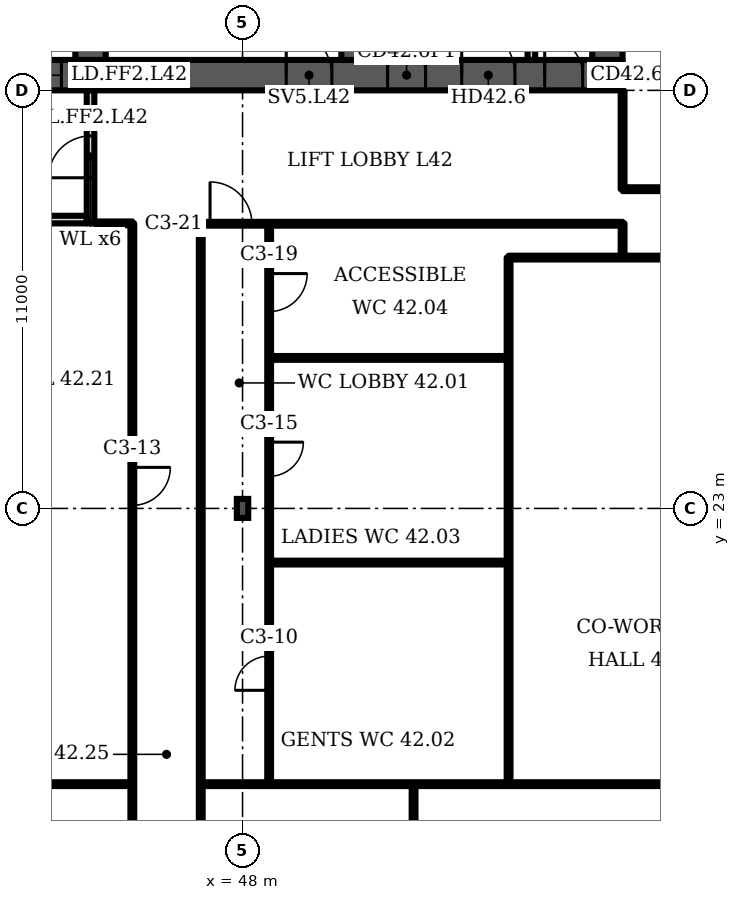
"""IFC4 building model, lengths in metres.
Left out: names, types, materials, properties, quantities, classifications, styles, units other than length and angle.
Written with IfcOpenShell. Run it as: python <this file> out.ifc"""

import sys

from ifc_helpers import new_model, si_unit, direction, frame, frame_2d, origin, origin_2d, place, context, subcontext, project, spatial, polyline, rectangle, i_section, outline, extrude, element, fill, save


model = new_model("IFC4")
c1 = context("Model", 3, precision=1e-05, world=origin(), true_north=direction((0.0, 1.0)))
c2 = subcontext(c1, "Body", "Model", "MODEL_VIEW")
j1 = project(units=[si_unit("LENGTHUNIT", "METRE"), si_unit("PLANEANGLEUNIT", "RADIAN")], contexts=[c1])
p1 = place(None, origin())
s1 = spatial("IfcSite", under=j1, at=p1, CompositionType="ELEMENT")
p2 = place(p1, origin())
s2 = spatial("IfcBuilding", under=s1, at=p2, CompositionType="ELEMENT")
p3 = place(p2, frame((0.0, 0.0, 173.5)))
s3 = spatial("IfcBuildingStorey", under=s2, at=p3, CompositionType="ELEMENT", Elevation=173.5)
p4 = place(p3, frame((16.0, 34.4, 0.0), z_axis=(0.0, 0.0, 1.0), x_axis=(1.0, 0.0, 0.0)))
e1 = element("IfcWall", 1, at=p4, inside=s3, PredefinedType="SHEAR", context=c2, shape_type="SweptSolid", body=[
    extrude(rectangle(XDim=42.0, YDim=0.8, at=frame_2d((21.0, 0.0))), origin(), (0.0, 0.0, 1.0), 3.6),
])
p5 = place(p4, frame((3.2, 0.0, 0.0)))
e2 = element("IfcOpeningElement", 2, at=p5, cuts=e1, PredefinedType="OPENING", context=c2, shape_type="SweptSolid", body=[
    extrude(rectangle(XDim=1.0, YDim=2.1, at=frame_2d((0.5, 1.05))), frame((0.0, 0.41, 0.0), z_axis=(0.0, -1.0, 0.0), x_axis=(1.0, 0.0, 0.0)), (0.0, 0.0, 1.0), 0.82),
])
p6 = place(p4, frame((7.65, 0.0, 0.0)))
e3 = element("IfcOpeningElement", 3, at=p6, cuts=e1, PredefinedType="OPENING", context=c2, shape_type="SweptSolid", body=[
    extrude(rectangle(XDim=1.2, YDim=2.1, at=frame_2d((0.6, 1.05))), frame((0.0, 0.41, 0.0), z_axis=(0.0, -1.0, 0.0), x_axis=(1.0, 0.0, 0.0)), (0.0, 0.0, 1.0), 0.82),
])
p7 = place(p4, frame((14.767, 0.0, 0.0)))
e4 = element("IfcOpeningElement", 4, at=p7, cuts=e1, PredefinedType="OPENING", context=c2, shape_type="SweptSolid", body=[
    extrude(rectangle(XDim=1.1, YDim=2.1, at=frame_2d((0.55, 1.05))), frame((0.0, 0.41, 0.0), z_axis=(0.0, -1.0, 0.0), x_axis=(1.0, 0.0, 0.0)), (0.0, 0.0, 1.0), 0.82),
])
p8 = place(p4, frame((19.133, 0.0, 0.0)))
e5 = element("IfcOpeningElement", 5, at=p8, cuts=e1, PredefinedType="OPENING", context=c2, shape_type="SweptSolid", body=[
    extrude(rectangle(XDim=1.1, YDim=2.1, at=frame_2d((0.55, 1.05))), frame((0.0, 0.41, 0.0), z_axis=(0.0, -1.0, 0.0), x_axis=(1.0, 0.0, 0.0)), (0.0, 0.0, 1.0), 0.82),
])
p9 = place(p4, frame((16.8, 0.0, 0.0)))
e6 = element("IfcOpeningElement", 6, at=p9, cuts=e1, PredefinedType="OPENING", context=c2, shape_type="SweptSolid", body=[
    extrude(rectangle(XDim=1.4, YDim=2.1, at=frame_2d((0.7, 1.05))), frame((0.0, 0.41, 0.0), z_axis=(0.0, -1.0, 0.0), x_axis=(1.0, 0.0, 0.0)), (0.0, 0.0, 1.0), 0.82),
])
p10 = place(p4, frame((21.767, 0.0, 0.0)))
e7 = element("IfcOpeningElement", 7, at=p10, cuts=e1, PredefinedType="OPENING", context=c2, shape_type="SweptSolid", body=[
    extrude(rectangle(XDim=1.1, YDim=2.1, at=frame_2d((0.55, 1.05))), frame((0.0, 0.41, 0.0), z_axis=(0.0, -1.0, 0.0), x_axis=(1.0, 0.0, 0.0)), (0.0, 0.0, 1.0), 0.82),
])
p11 = place(p4, frame((23.95, 0.0, 0.0)))
e8 = element("IfcOpeningElement", 8, at=p11, cuts=e1, PredefinedType="OPENING", context=c2, shape_type="SweptSolid", body=[
    extrude(rectangle(XDim=1.1, YDim=2.1, at=frame_2d((0.55, 1.05))), frame((0.0, 0.41, 0.0), z_axis=(0.0, -1.0, 0.0), x_axis=(1.0, 0.0, 0.0)), (0.0, 0.0, 1.0), 0.82),
])
p12 = place(p4, frame((26.133, 0.0, 0.0)))
e9 = element("IfcOpeningElement", 9, at=p12, cuts=e1, PredefinedType="OPENING", context=c2, shape_type="SweptSolid", body=[
    extrude(rectangle(XDim=1.1, YDim=2.1, at=frame_2d((0.55, 1.05))), frame((0.0, 0.41, 0.0), z_axis=(0.0, -1.0, 0.0), x_axis=(1.0, 0.0, 0.0)), (0.0, 0.0, 1.0), 0.82),
])
p13 = place(p4, frame((33.15, 0.0, 0.0)))
e10 = element("IfcOpeningElement", 10, at=p13, cuts=e1, PredefinedType="OPENING", context=c2, shape_type="SweptSolid", body=[
    extrude(rectangle(XDim=1.2, YDim=2.1, at=frame_2d((0.6, 1.05))), frame((0.0, 0.41, 0.0), z_axis=(0.0, -1.0, 0.0), x_axis=(1.0, 0.0, 0.0)), (0.0, 0.0, 1.0), 0.82),
])
p14 = place(p4, frame((35.817, 0.0, 0.0)))
e11 = element("IfcOpeningElement", 11, at=p14, cuts=e1, PredefinedType="OPENING", context=c2, shape_type="SweptSolid", body=[
    extrude(rectangle(XDim=1.0, YDim=2.1, at=frame_2d((0.5, 1.05))), frame((0.0, 0.41, 0.0), z_axis=(0.0, -1.0, 0.0), x_axis=(1.0, 0.0, 0.0)), (0.0, 0.0, 1.0), 0.82),
])
p15 = place(p4, frame((39.95, 0.0, 0.0)))
e12 = element("IfcOpeningElement", 12, at=p15, cuts=e1, PredefinedType="OPENING", context=c2, shape_type="SweptSolid", body=[
    extrude(rectangle(XDim=1.0, YDim=2.1, at=frame_2d((0.5, 1.05))), frame((0.0, 0.41, 0.0), z_axis=(0.0, -1.0, 0.0), x_axis=(1.0, 0.0, 0.0)), (0.0, 0.0, 1.0), 0.82),
])
p16 = place(p4, frame((37.767, 0.0, 0.0)))
e13 = element("IfcOpeningElement", 13, at=p16, cuts=e1, PredefinedType="OPENING", context=c2, shape_type="SweptSolid", body=[
    extrude(rectangle(XDim=1.4, YDim=2.1, at=frame_2d((0.7, 1.05))), frame((0.0, 0.41, 0.0), z_axis=(0.0, -1.0, 0.0), x_axis=(1.0, 0.0, 0.0)), (0.0, 0.0, 1.0), 0.82),
])
p17 = place(p3, frame((44.0, 34.8, 0.0), z_axis=(0.0, 0.0, 1.0), x_axis=(0.0, 1.0, 0.0)))
e14 = element("IfcWall", 14, at=p17, inside=s3, PredefinedType="SHEAR", context=c2, shape_type="SweptSolid", body=[
    extrude(rectangle(XDim=14.374, YDim=0.8, at=frame_2d((7.187, 0.0))), origin(), (0.0, 0.0, 1.0), 3.6),
])
p18 = place(p17, frame((11.312, 0.0, 0.0)))
e15 = element("IfcOpeningElement", 15, at=p18, cuts=e14, PredefinedType="OPENING", context=c2, shape_type="SweptSolid", body=[
    extrude(rectangle(XDim=1.0, YDim=2.1, at=frame_2d((0.5, 1.05))), frame((0.0, 0.41, 0.0), z_axis=(0.0, -1.0, 0.0), x_axis=(1.0, 0.0, 0.0)), (0.0, 0.0, 1.0), 0.82),
])
p19 = place(p17, frame((3.6, 0.0, 0.0)))
e16 = element("IfcOpeningElement", 16, at=p19, cuts=e14, PredefinedType="OPENING", context=c2, shape_type="SweptSolid", body=[
    extrude(rectangle(XDim=1.1, YDim=2.1, at=frame_2d((0.55, 1.05))), frame((0.0, 0.41, 0.0), z_axis=(0.0, -1.0, 0.0), x_axis=(1.0, 0.0, 0.0)), (0.0, 0.0, 1.0), 0.82),
])
p20 = place(p3, frame((51.0, 34.8, 0.0), z_axis=(0.0, 0.0, 1.0), x_axis=(0.0, 1.0, 0.0)))
e17 = element("IfcWall", 17, at=p20, inside=s3, PredefinedType="SHEAR", context=c2, shape_type="SweptSolid", body=[
    extrude(rectangle(XDim=13.762, YDim=0.8, at=frame_2d((6.881, 0.0))), origin(), (0.0, 0.0, 1.0), 3.6),
])
p21 = place(p20, frame((3.6, 0.0, 0.0)))
e18 = element("IfcOpeningElement", 18, at=p21, cuts=e17, PredefinedType="OPENING", context=c2, shape_type="SweptSolid", body=[
    extrude(rectangle(XDim=1.1, YDim=2.1, at=frame_2d((0.55, 1.05))), frame((0.0, 0.41, 0.0), z_axis=(0.0, -1.0, 0.0), x_axis=(1.0, 0.0, 0.0)), (0.0, 0.0, 1.0), 0.82),
])
p22 = place(p3, frame((57.6, 34.8, 0.0), z_axis=(0.0, 0.0, 1.0), x_axis=(0.0, 1.0, 0.0)))
e19 = element("IfcWall", 19, at=p22, inside=s3, PredefinedType="SHEAR", context=c2, shape_type="SweptSolid", body=[
    extrude(rectangle(XDim=13.184, YDim=0.8, at=frame_2d((6.592, 0.0))), origin(), (0.0, 0.0, 1.0), 3.6),
])
p23 = place(p3, frame((48.0, 23.0, 0.0), z_axis=(0.0, 0.0, 1.0), x_axis=(1.0, 0.0, 0.0)))
e20 = element("IfcColumn", 20, at=p23, inside=s3, PredefinedType="COLUMN", context=c2, shape_type="SweptSolid", body=[
    extrude(i_section(OverallWidth=0.3, OverallDepth=0.5, WebThickness=0.014, FlangeThickness=0.028, FilletRadius=0.027, at=origin_2d()), origin(), (0.0, 0.0, 1.0), 3.6),
])
p24 = place(p3, frame((0.0, 0.0, -0.0)))
e21 = element("IfcWall", 21, at=p24, inside=s3, PredefinedType="PARTITIONING", context=c2, shape_type="SweptSolid", body=[
    extrude(outline(polyline([(41.567, 37.1), (39.433, 37.1), (39.433, 34.8), (39.233, 34.8), (39.233, 37.65), (37.4, 37.65), (37.4, 37.85), (39.233, 37.85), (39.433, 37.85), (39.433, 37.3), (41.567, 37.3), (41.567, 37.55), (41.767, 37.55), (43.6, 37.55), (43.6, 37.35), (41.767, 37.35), (41.767, 34.8), (41.567, 34.8), (41.567, 37.1)])), origin(), (0.0, 0.0, 1.0), 3.2),
])
p25 = place(p3, frame((0.0, 0.0, -0.0)))
e22 = element("IfcWall", 22, at=p25, inside=s3, PredefinedType="PARTITIONING", context=c2, shape_type="SweptSolid", body=[
    extrude(outline(polyline([(53.233, 34.8), (53.233, 37.3), (53.433, 37.3), (53.433, 34.8), (53.233, 34.8)])), origin(), (0.0, 0.0, 1.0), 3.2),
])
p26 = place(p3, frame((0.0, 0.0, -0.0)))
e23 = element("IfcWall", 23, at=p26, inside=s3, PredefinedType="PARTITIONING", context=c2, shape_type="SweptSolid", body=[
    extrude(outline(polyline([(55.5, 34.8), (55.5, 37.3), (55.7, 37.3), (55.7, 34.8), (55.5, 34.8)])), origin(), (0.0, 0.0, 1.0), 3.2),
])
p27 = place(p3, frame((44.0, 30.5, 0.0), z_axis=(0.0, 0.0, 1.0), x_axis=(0.0, 1.0, 0.0)))
e24 = element("IfcWall", 24, at=p27, inside=s3, PredefinedType="PARTITIONING", context=c2, shape_type="SweptSolid", body=[
    extrude(rectangle(XDim=3.5, YDim=0.2, at=frame_2d((1.75, 0.0))), origin(), (0.0, 0.0, 1.0), 3.2),
])
p28 = place(p27, frame((1.2, 0.0, 0.0)))
e25 = element("IfcOpeningElement", 25, at=p28, cuts=e24, PredefinedType="OPENING", context=c2, shape_type="SweptSolid", body=[
    extrude(rectangle(XDim=1.1, YDim=2.1, at=frame_2d((0.55, 1.05))), frame((0.0, 0.11, 0.0), z_axis=(0.0, -1.0, 0.0), x_axis=(1.0, 0.0, 0.0)), (0.0, 0.0, 1.0), 0.22),
])
p29 = place(p3, frame((41.1, 30.6, 0.0), z_axis=(0.0, 0.0, 1.0), x_axis=(1.0, 0.0, 0.0)))
e26 = element("IfcWall", 26, at=p29, inside=s3, PredefinedType="PARTITIONING", context=c2, shape_type="SweptSolid", body=[
    extrude(rectangle(XDim=2.8, YDim=0.2, at=frame_2d((1.4, 0.0))), origin(), (0.0, 0.0, 1.0), 3.2),
])
p30 = place(p3, frame((27.4, 15.745, 0.0), z_axis=(0.0, 0.0, 1.0), x_axis=(1.0, 0.0, 0.0)))
e27 = element("IfcWall", 27, at=p30, inside=s3, PredefinedType="PARTITIONING", context=c2, shape_type="SweptSolid", body=[
    extrude(rectangle(XDim=17.7, YDim=0.1, at=frame_2d((8.85, 0.0))), origin(), (0.0, 0.0, 1.0), 3.2),
])
p31 = place(p3, frame((45.1, 1.087, 0.0), z_axis=(0.0, 0.0, 1.0), x_axis=(0.0, 1.0, 0.0)))
e28 = element("IfcWall", 28, at=p31, inside=s3, PredefinedType="PARTITIONING", context=c2, shape_type="SweptSolid", body=[
    extrude(rectangle(XDim=29.413, YDim=0.1, at=frame_2d((14.707, 0.0))), origin(), (0.0, 0.0, 1.0), 3.2),
])
p32 = place(p31, frame((6.438, 0.0, 0.0)))
e29 = element("IfcOpeningElement", 29, at=p32, cuts=e28, PredefinedType="OPENING", context=c2, shape_type="SweptSolid", body=[
    extrude(rectangle(XDim=1.8, YDim=2.1, at=frame_2d((0.9, 1.05))), frame((0.0, 0.06, 0.0), z_axis=(0.0, -1.0, 0.0), x_axis=(1.0, 0.0, 0.0)), (0.0, 0.0, 1.0), 0.12),
])
p33 = place(p31, frame((21.993, 0.0, 0.0)))
e30 = element("IfcOpeningElement", 30, at=p33, cuts=e28, PredefinedType="OPENING", context=c2, shape_type="SweptSolid", body=[
    extrude(rectangle(XDim=1.0, YDim=2.1, at=frame_2d((0.5, 1.05))), frame((0.0, 0.06, 0.0), z_axis=(0.0, -1.0, 0.0), x_axis=(1.0, 0.0, 0.0)), (0.0, 0.0, 1.0), 0.12),
])
p34 = place(p3, frame((46.9, 1.087, 0.0), z_axis=(0.0, 0.0, 1.0), x_axis=(0.0, 1.0, 0.0)))
e31 = element("IfcWall", 31, at=p34, inside=s3, PredefinedType="PARTITIONING", context=c2, shape_type="SweptSolid", body=[
    extrude(rectangle(XDim=29.403, YDim=0.1, at=frame_2d((14.702, 0.0))), origin(), (0.0, 0.0, 1.0), 3.2),
])
p35 = place(p34, frame((6.798, 0.0, 0.0)))
e32 = element("IfcOpeningElement", 32, at=p35, cuts=e31, PredefinedType="OPENING", context=c2, shape_type="SweptSolid", body=[
    extrude(rectangle(XDim=1.0, YDim=2.1, at=frame_2d((0.5, 1.05))), frame((0.0, 0.06, 0.0), z_axis=(0.0, -1.0, 0.0), x_axis=(1.0, 0.0, 0.0)), (0.0, 0.0, 1.0), 0.12),
])
p36 = place(p3, frame((46.91, 15.745, 0.0), z_axis=(0.0, 0.0, 1.0), x_axis=(1.0, 0.0, 0.0)))
e33 = element("IfcWall", 33, at=p36, inside=s3, PredefinedType="PARTITIONING", context=c2, shape_type="SweptSolid", body=[
    extrude(rectangle(XDim=17.69, YDim=0.1, at=frame_2d((8.845, 0.0))), origin(), (0.0, 0.0, 1.0), 3.2),
])
p37 = place(p3, frame((46.91, 30.49, 0.0), z_axis=(0.0, 0.0, 1.0), x_axis=(1.0, 0.0, 0.0)))
e34 = element("IfcWall", 34, at=p37, inside=s3, PredefinedType="PARTITIONING", context=c2, shape_type="SweptSolid", body=[
    extrude(rectangle(XDim=11.09, YDim=0.1, at=frame_2d((5.545, 0.0))), origin(), (0.0, 0.0, 1.0), 3.2),
])
p38 = place(p37, frame((0.235, 0.0, 0.0)))
e35 = element("IfcOpeningElement", 35, at=p38, cuts=e34, PredefinedType="OPENING", context=c2, shape_type="SweptSolid", body=[
    extrude(rectangle(XDim=1.1, YDim=2.1, at=frame_2d((0.55, 1.05))), frame((0.0, 0.06, 0.0), z_axis=(0.0, -1.0, 0.0), x_axis=(1.0, 0.0, 0.0)), (0.0, 0.0, 1.0), 0.12),
])
p39 = place(p3, frame((48.7, 15.745, 0.0), z_axis=(0.0, 0.0, 1.0), x_axis=(0.0, 1.0, 0.0)))
e36 = element("IfcWall", 36, at=p39, inside=s3, PredefinedType="PARTITIONING", context=c2, shape_type="SweptSolid", body=[
    extrude(rectangle(XDim=14.745, YDim=0.1, at=frame_2d((7.373, 0.0))), origin(), (0.0, 0.0, 1.0), 3.2),
])
p40 = place(p39, frame((2.469, 0.0, 0.0)))
e37 = element("IfcOpeningElement", 37, at=p40, cuts=e36, PredefinedType="OPENING", context=c2, shape_type="SweptSolid", body=[
    extrude(rectangle(XDim=0.9, YDim=2.1, at=frame_2d((0.45, 1.05))), frame((0.0, 0.06, 0.0), z_axis=(0.0, -1.0, 0.0), x_axis=(1.0, 0.0, 0.0)), (0.0, 0.0, 1.0), 0.12),
])
p41 = place(p39, frame((8.099, 0.0, 0.0)))
e38 = element("IfcOpeningElement", 38, at=p41, cuts=e36, PredefinedType="OPENING", context=c2, shape_type="SweptSolid", body=[
    extrude(rectangle(XDim=0.9, YDim=2.1, at=frame_2d((0.45, 1.05))), frame((0.0, 0.06, 0.0), z_axis=(0.0, -1.0, 0.0), x_axis=(1.0, 0.0, 0.0)), (0.0, 0.0, 1.0), 0.12),
])
p42 = place(p39, frame((12.434, 0.0, 0.0)))
e39 = element("IfcOpeningElement", 39, at=p42, cuts=e36, PredefinedType="OPENING", context=c2, shape_type="SweptSolid", body=[
    extrude(rectangle(XDim=1.0, YDim=2.1, at=frame_2d((0.5, 1.05))), frame((0.0, 0.06, 0.0), z_axis=(0.0, -1.0, 0.0), x_axis=(1.0, 0.0, 0.0)), (0.0, 0.0, 1.0), 0.12),
])
for number, where, z_axis, x_axis in (
    (40, (48.7, 21.575, 0.0), (0.0, 0.0, 1.0), (1.0, 0.0, 0.0)),
    (41, (48.7, 26.96, 0.0), (0.0, 0.0, 1.0), (1.0, 0.0, 0.0)),
):
    element("IfcWall", number, at=place(p3, frame(where, z_axis=z_axis, x_axis=x_axis)), inside=s3, PredefinedType="PARTITIONING", context=c2, shape_type="SweptSolid", body=[
        extrude(rectangle(XDim=6.3, YDim=0.1, at=frame_2d((3.15, 0.0))), origin(), (0.0, 0.0, 1.0), 3.2),
    ])
p43 = place(p3, frame((52.5, 1.98, 0.0), z_axis=(0.0, 0.0, 1.0), x_axis=(0.0, 1.0, 0.0)))
e42 = element("IfcWall", 42, at=p43, inside=s3, PredefinedType="PARTITIONING", context=c2, shape_type="SweptSolid", body=[
    extrude(rectangle(XDim=13.765, YDim=0.1, at=frame_2d((6.883, 0.0))), origin(), (0.0, 0.0, 1.0), 3.2),
])
p44 = place(p3, frame((55.0, 15.745, 0.0), z_axis=(0.0, 0.0, 1.0), x_axis=(0.0, 1.0, 0.0)))
e43 = element("IfcWall", 43, at=p44, inside=s3, PredefinedType="PARTITIONING", context=c2, shape_type="SweptSolid", body=[
    extrude(rectangle(XDim=13.855, YDim=0.1, at=frame_2d((6.927, 0.0))), origin(), (0.0, 0.0, 1.0), 3.2),
])
p45 = place(p3, frame((55.0, 29.6, 0.0), z_axis=(0.0, 0.0, 1.0), x_axis=(1.0, 0.0, 0.0)))
e44 = element("IfcWall", 44, at=p45, inside=s3, PredefinedType="PARTITIONING", context=c2, shape_type="SweptSolid", body=[
    extrude(rectangle(XDim=6.44, YDim=0.1, at=frame_2d((3.22, 0.0))), origin(), (0.0, 0.0, 1.0), 3.2),
])
p46 = place(p3, frame((58.0, 29.6, 0.0), z_axis=(0.0, 0.0, 1.0), x_axis=(0.0, 1.0, 0.0)))
e45 = element("IfcWall", 45, at=p46, inside=s3, PredefinedType="PARTITIONING", context=c2, shape_type="SweptSolid", body=[
    extrude(rectangle(XDim=0.9, YDim=0.1, at=frame_2d((0.45, 0.0))), origin(), (0.0, 0.0, 1.0), 3.2),
])
p47 = place(p3, frame((58.0, 31.4, 0.0), z_axis=(0.0, 0.0, 1.0), x_axis=(0.0, 1.0, 0.0)))
e46 = element("IfcWall", 46, at=p47, inside=s3, PredefinedType="PARTITIONING", context=c2, shape_type="SweptSolid", body=[
    extrude(rectangle(XDim=2.58, YDim=0.1, at=frame_2d((1.29, 0.0))), origin(), (0.0, 0.0, 1.0), 3.2),
])
p48 = place(p3, frame((58.0, 31.4, 0.0), z_axis=(0.0, 0.0, 1.0), x_axis=(1.0, 0.0, 0.0)))
e47 = element("IfcWall", 47, at=p48, inside=s3, PredefinedType="PARTITIONING", context=c2, shape_type="SweptSolid", body=[
    extrude(rectangle(XDim=8.4, YDim=0.1, at=frame_2d((4.2, 0.0))), origin(), (0.0, 0.0, 1.0), 3.2),
])
p49 = place(p48, frame((3.98, 0.0, 0.0)))
e48 = element("IfcOpeningElement", 48, at=p49, cuts=e47, PredefinedType="OPENING", context=c2, shape_type="SweptSolid", body=[
    extrude(rectangle(XDim=1.8, YDim=2.1, at=frame_2d((0.9, 1.05))), frame((0.0, 0.06, 0.0), z_axis=(0.0, -1.0, 0.0), x_axis=(1.0, 0.0, 0.0)), (0.0, 0.0, 1.0), 0.12),
])
p50 = place(p3, frame((44.15, 30.5, 0.0), z_axis=(0.0, 0.0, 1.0), x_axis=(1.0, 0.0, 0.0)))
e49 = element("IfcWall", 49, at=p50, inside=s3, PredefinedType="PARTITIONING", context=c2, shape_type="SweptSolid", body=[
    extrude(rectangle(XDim=0.95, YDim=0.1, at=frame_2d((0.475, 0.0))), origin(), (0.0, 0.0, 1.0), 3.2),
])
p51 = place(p12, origin())
e50 = element("IfcDoor", 50, at=p51, inside=s3, OperationType="DOUBLE_DOOR_SLIDING", PredefinedType="DOOR", context=c2, shape_type="SweptSolid", body=[
    extrude(rectangle(XDim=1.1, YDim=2.1, at=frame_2d((0.55, 1.05))), frame((0.0, 0.025, 0.0), z_axis=(0.0, -1.0, 0.0), x_axis=(1.0, 0.0, 0.0)), (0.0, 0.0, 1.0), 0.05),
])
fill(e9, e50)
p52 = place(p13, origin())
e51 = element("IfcDoor", 51, at=p52, inside=s3, OperationType="SINGLE_SWING_LEFT", PredefinedType="DOOR", context=c2, shape_type="SweptSolid", body=[
    extrude(rectangle(XDim=1.2, YDim=2.1, at=frame_2d((0.6, 1.05))), frame((0.0, 0.025, 0.0), z_axis=(0.0, -1.0, 0.0), x_axis=(1.0, 0.0, 0.0)), (0.0, 0.0, 1.0), 0.05),
])
fill(e10, e51)
p53 = place(p14, origin())
e52 = element("IfcDoor", 52, at=p53, inside=s3, OperationType="SINGLE_SWING_LEFT", PredefinedType="DOOR", context=c2, shape_type="SweptSolid", body=[
    extrude(rectangle(XDim=1.0, YDim=2.1, at=frame_2d((0.5, 1.05))), frame((0.0, 0.4, 0.0), z_axis=(0.0, -1.0, 0.0), x_axis=(1.0, 0.0, 0.0)), (0.0, 0.0, 1.0), 0.8),
])
fill(e11, e52)
p54 = place(p15, origin())
e53 = element("IfcDoor", 53, at=p54, inside=s3, OperationType="SINGLE_SWING_LEFT", PredefinedType="DOOR", context=c2, shape_type="SweptSolid", body=[
    extrude(rectangle(XDim=1.0, YDim=2.1, at=frame_2d((0.5, 1.05))), frame((0.0, 0.4, 0.0), z_axis=(0.0, -1.0, 0.0), x_axis=(1.0, 0.0, 0.0)), (0.0, 0.0, 1.0), 0.8),
])
fill(e12, e53)
p55 = place(p16, origin())
e54 = element("IfcDoor", 54, at=p55, inside=s3, OperationType="DOUBLE_DOOR_SINGLE_SWING", PredefinedType="DOOR", context=c2, shape_type="SweptSolid", body=[
    extrude(rectangle(XDim=1.4, YDim=2.1, at=frame_2d((0.7, 1.05))), frame((0.0, 0.025, 0.0), z_axis=(0.0, -1.0, 0.0), x_axis=(1.0, 0.0, 0.0)), (0.0, 0.0, 1.0), 0.05),
])
fill(e13, e54)
p56 = place(p28, origin())
e55 = element("IfcDoor", 55, at=p56, inside=s3, OperationType="SINGLE_SWING_LEFT", PredefinedType="DOOR", context=c2, shape_type="SweptSolid", body=[
    extrude(rectangle(XDim=1.1, YDim=2.1, at=frame_2d((0.55, 1.05))), frame((0.0, 0.025, 0.0), z_axis=(0.0, -1.0, 0.0), x_axis=(1.0, 0.0, 0.0)), (0.0, 0.0, 1.0), 0.05),
])
fill(e25, e55)
p57 = place(p40, origin())
e56 = element("IfcDoor", 56, at=p57, inside=s3, OperationType="SINGLE_SWING_LEFT", PredefinedType="DOOR", context=c2, shape_type="SweptSolid", body=[
    extrude(rectangle(XDim=0.9, YDim=2.1, at=frame_2d((0.45, 1.05))), frame((0.0, 0.025, 0.0), z_axis=(0.0, -1.0, 0.0), x_axis=(1.0, 0.0, 0.0)), (0.0, 0.0, 1.0), 0.05),
])
fill(e37, e56)
p58 = place(p33, origin())
e57 = element("IfcDoor", 57, at=p58, inside=s3, OperationType="SINGLE_SWING_RIGHT", PredefinedType="DOOR", context=c2, shape_type="SweptSolid", body=[
    extrude(rectangle(XDim=1.0, YDim=2.1, at=frame_2d((0.5, 1.05))), frame((0.0, 0.025, 0.0), z_axis=(0.0, -1.0, 0.0), x_axis=(1.0, 0.0, 0.0)), (0.0, 0.0, 1.0), 0.05),
])
fill(e30, e57)
p59 = place(p41, origin())
e58 = element("IfcDoor", 58, at=p59, inside=s3, OperationType="SINGLE_SWING_RIGHT", PredefinedType="DOOR", context=c2, shape_type="SweptSolid", body=[
    extrude(rectangle(XDim=0.9, YDim=2.1, at=frame_2d((0.45, 1.05))), frame((0.0, 0.025, 0.0), z_axis=(0.0, -1.0, 0.0), x_axis=(1.0, 0.0, 0.0)), (0.0, 0.0, 1.0), 0.05),
])
fill(e38, e58)
p60 = place(p42, origin())
e59 = element("IfcDoor", 59, at=p60, inside=s3, OperationType="SINGLE_SWING_RIGHT", PredefinedType="DOOR", context=c2, shape_type="SweptSolid", body=[
    extrude(rectangle(XDim=1.0, YDim=2.1, at=frame_2d((0.5, 1.05))), frame((0.0, 0.025, 0.0), z_axis=(0.0, -1.0, 0.0), x_axis=(1.0, 0.0, 0.0)), (0.0, 0.0, 1.0), 0.05),
])
fill(e39, e59)
p61 = place(p38, origin())
e60 = element("IfcDoor", 60, at=p61, inside=s3, OperationType="SINGLE_SWING_LEFT", PredefinedType="DOOR", context=c2, shape_type="SweptSolid", body=[
    extrude(rectangle(XDim=1.1, YDim=2.1, at=frame_2d((0.55, 1.05))), frame((0.0, 0.025, 0.0), z_axis=(0.0, -1.0, 0.0), x_axis=(1.0, 0.0, 0.0)), (0.0, 0.0, 1.0), 0.05),
])
fill(e35, e60)
save(model, sys.argv[1])
